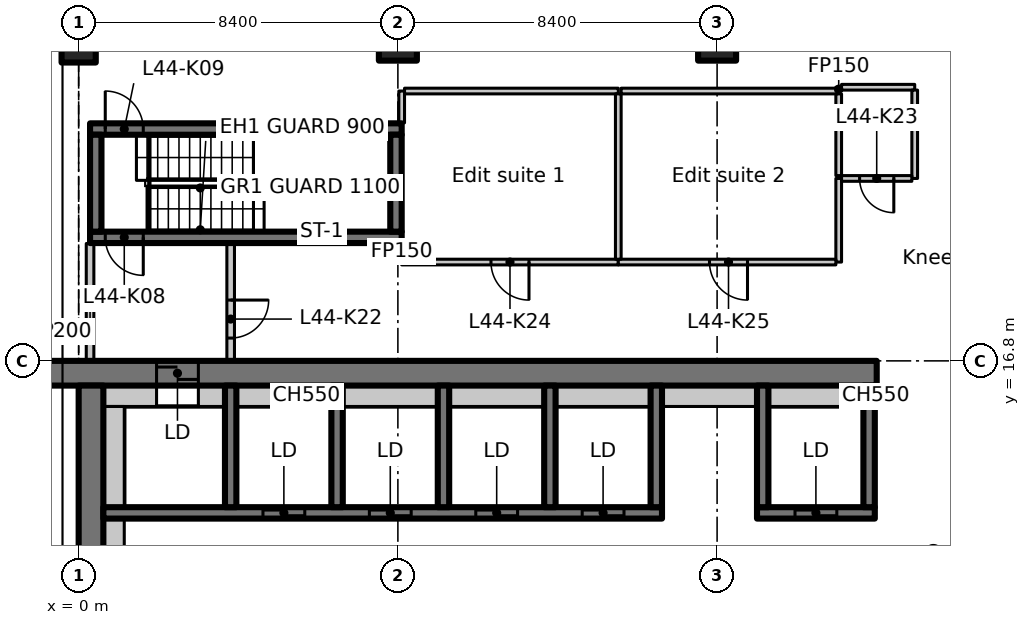
"""IFC4 building model, lengths in metres.
Left out: names, types, materials, properties, quantities, classifications, styles, units other than length and angle.
Written with IfcOpenShell. Run it as: python <this file> out.ifc"""

import sys

from ifc_helpers import new_model, si_unit, direction, frame, frame_2d, origin, origin_2d, place, context, subcontext, project, spatial, rectangle, extrude, element, fill, save


model = new_model("IFC4")
c1 = context("Model", 3, precision=1e-05, world=origin(), true_north=direction((0.0, 1.0)))
c2 = subcontext(c1, "Body", "Model", "MODEL_VIEW")
j1 = project(units=[si_unit("LENGTHUNIT", "METRE"), si_unit("PLANEANGLEUNIT", "RADIAN")], contexts=[c1])
p1 = place(None, origin())
s1 = spatial("IfcSite", under=j1, at=p1, CompositionType="ELEMENT")
p2 = place(p1, origin())
s2 = spatial("IfcBuilding", under=s1, at=p2, CompositionType="ELEMENT")
p3 = place(p2, frame((0.0, 0.0, 177.6)))
s3 = spatial("IfcBuildingStorey", under=s2, at=p3, CompositionType="ELEMENT", Elevation=177.6)
p4 = place(p3, frame((0.0, 25.2, 0.0), z_axis=(0.0, 0.0, 1.0), x_axis=(1.0, 0.0, 0.0)))
e1 = element("IfcColumn", 1, at=p4, inside=s3, PredefinedType="COLUMN", context=c2, shape_type="SweptSolid", body=[
    extrude(rectangle(XDim=0.9, YDim=1.1, at=origin_2d()), origin(), (0.0, 0.0, 1.0), 3.35),
])
for number, where, z_axis, x_axis in (
    (2, (8.4, 25.2, 0.0), (0.0, 0.0, 1.0), (1.0, 0.0, 0.0)),
    (3, (16.8, 25.2, 0.0), (0.0, 0.0, 1.0), (1.0, 0.0, 0.0)),
):
    element("IfcColumn", number, at=place(p3, frame(where, z_axis=z_axis, x_axis=x_axis)), inside=s3, PredefinedType="COLUMN", context=c2, shape_type="SweptSolid", body=[
        extrude(rectangle(XDim=1.0, YDim=1.0, at=origin_2d()), origin(), (0.0, 0.0, 1.0), 3.35),
    ])
p5 = place(p3, frame((-1.1, 16.475, 0.0), z_axis=(0.0, 0.0, 1.0), x_axis=(1.0, 0.0, 0.0)))
e4 = element("IfcWall", 4, at=p5, inside=s3, PredefinedType="SHEAR", context=c2, shape_type="SweptSolid", body=[
    extrude(rectangle(XDim=22.1, YDim=0.65, at=frame_2d((11.05, 0.0))), origin(), (0.0, 0.0, 1.0), 3.35),
])
p6 = place(p5, frame((3.15, 0.0, 0.0)))
e5 = element("IfcOpeningElement", 5, at=p6, cuts=e4, PredefinedType="OPENING", context=c2, shape_type="SweptSolid", body=[
    extrude(rectangle(XDim=1.1, YDim=2.3, at=frame_2d((0.55, 1.15))), frame((0.0, 0.335, 0.0), z_axis=(0.0, -1.0, 0.0), x_axis=(1.0, 0.0, 0.0)), (0.0, 0.0, 1.0), 0.67),
])
p7 = place(p3, frame((0.325, 7.286, 0.0), z_axis=(0.0, 0.0, 1.0), x_axis=(0.0, 1.0, 0.0)))
e6 = element("IfcWall", 6, at=p7, inside=s3, PredefinedType="SHEAR", context=c2, shape_type="SweptSolid", body=[
    extrude(rectangle(XDim=8.864, YDim=0.65, at=frame_2d((4.432, 0.0))), origin(), (0.0, 0.0, 1.0), 3.35),
])
p8 = place(p3, frame((0.65, 15.875, 0.0), z_axis=(0.0, 0.0, 1.0), x_axis=(1.0, 0.0, 0.0)))
e7 = element("IfcWall", 7, at=p8, inside=s3, PredefinedType="PARTITIONING", context=c2, shape_type="SweptSolid", body=[
    extrude(rectangle(XDim=1.4, YDim=0.55, at=frame_2d((0.7, 0.0))), origin(), (0.0, 0.0, 1.0), 3.35),
])
p9 = place(p3, frame((0.65, 12.8, 0.0), z_axis=(0.0, 0.0, 1.0), x_axis=(1.0, 0.0, 0.0)))
e8 = element("IfcWall", 8, at=p9, inside=s3, PredefinedType="SHEAR", context=c2, shape_type="SweptSolid", body=[
    extrude(rectangle(XDim=14.7, YDim=0.3, at=frame_2d((7.35, 0.0))), origin(), (0.0, 0.0, 1.0), 3.35),
])
p10 = place(p9, frame((4.2, 0.0, 0.0)))
e9 = element("IfcOpeningElement", 9, at=p10, cuts=e8, PredefinedType="OPENING", context=c2, shape_type="SweptSolid", body=[
    extrude(rectangle(XDim=1.1, YDim=2.3, at=frame_2d((0.55, 1.15))), frame((0.0, 0.16, 0.0), z_axis=(0.0, -1.0, 0.0), x_axis=(1.0, 0.0, 0.0)), (0.0, 0.0, 1.0), 0.32),
])
p11 = place(p9, frame((7.0, 0.0, 0.0)))
e10 = element("IfcOpeningElement", 10, at=p11, cuts=e8, PredefinedType="OPENING", context=c2, shape_type="SweptSolid", body=[
    extrude(rectangle(XDim=1.1, YDim=2.3, at=frame_2d((0.55, 1.15))), frame((0.0, 0.16, 0.0), z_axis=(0.0, -1.0, 0.0), x_axis=(1.0, 0.0, 0.0)), (0.0, 0.0, 1.0), 0.32),
])
p12 = place(p9, frame((9.8, 0.0, 0.0)))
e11 = element("IfcOpeningElement", 11, at=p12, cuts=e8, PredefinedType="OPENING", context=c2, shape_type="SweptSolid", body=[
    extrude(rectangle(XDim=1.1, YDim=2.3, at=frame_2d((0.55, 1.15))), frame((0.0, 0.16, 0.0), z_axis=(0.0, -1.0, 0.0), x_axis=(1.0, 0.0, 0.0)), (0.0, 0.0, 1.0), 0.32),
])
p13 = place(p9, frame((12.6, 0.0, 0.0)))
e12 = element("IfcOpeningElement", 12, at=p13, cuts=e8, PredefinedType="OPENING", context=c2, shape_type="SweptSolid", body=[
    extrude(rectangle(XDim=1.1, YDim=2.3, at=frame_2d((0.55, 1.15))), frame((0.0, 0.16, 0.0), z_axis=(0.0, -1.0, 0.0), x_axis=(1.0, 0.0, 0.0)), (0.0, 0.0, 1.0), 0.32),
])
for number, where, z_axis, x_axis in (
    (13, (4.0, 12.95, 0.0), (0.0, 0.0, 1.0), (0.0, 1.0, 0.0)),
    (14, (6.8, 12.95, 0.0), (0.0, 0.0, 1.0), (0.0, 1.0, 0.0)),
    (15, (9.6, 12.95, 0.0), (0.0, 0.0, 1.0), (0.0, 1.0, 0.0)),
    (16, (12.4, 12.95, 0.0), (0.0, 0.0, 1.0), (0.0, 1.0, 0.0)),
    (17, (15.2, 12.95, 0.0), (0.0, 0.0, 1.0), (0.0, 1.0, 0.0)),
):
    element("IfcWall", number, at=place(p3, frame(where, z_axis=z_axis, x_axis=x_axis)), inside=s3, PredefinedType="SHEAR", context=c2, shape_type="SweptSolid", body=[
        extrude(rectangle(XDim=3.2, YDim=0.3, at=frame_2d((1.6, 0.0))), origin(), (0.0, 0.0, 1.0), 3.35),
    ])
p14 = place(p3, frame((17.85, 12.8, 0.0), z_axis=(0.0, 0.0, 1.0), x_axis=(1.0, 0.0, 0.0)))
e18 = element("IfcWall", 18, at=p14, inside=s3, PredefinedType="SHEAR", context=c2, shape_type="SweptSolid", body=[
    extrude(rectangle(XDim=3.1, YDim=0.3, at=frame_2d((1.55, 0.0))), origin(), (0.0, 0.0, 1.0), 3.35),
])
p15 = place(p14, frame((1.0, 0.0, 0.0)))
e19 = element("IfcOpeningElement", 19, at=p15, cuts=e18, PredefinedType="OPENING", context=c2, shape_type="SweptSolid", body=[
    extrude(rectangle(XDim=1.1, YDim=2.3, at=frame_2d((0.55, 1.15))), frame((0.0, 0.16, 0.0), z_axis=(0.0, -1.0, 0.0), x_axis=(1.0, 0.0, 0.0)), (0.0, 0.0, 1.0), 0.32),
])
for number, where, z_axis, x_axis in (
    (20, (18.0, 12.95, 0.0), (0.0, 0.0, 1.0), (0.0, 1.0, 0.0)),
    (21, (20.8, 12.95, 0.0), (0.0, 0.0, 1.0), (0.0, 1.0, 0.0)),
):
    element("IfcWall", number, at=place(p3, frame(where, z_axis=z_axis, x_axis=x_axis)), inside=s3, PredefinedType="SHEAR", context=c2, shape_type="SweptSolid", body=[
        extrude(rectangle(XDim=3.2, YDim=0.3, at=frame_2d((1.6, 0.0))), origin(), (0.0, 0.0, 1.0), 3.35),
    ])
p16 = place(p3, frame((8.5, 20.05, 0.0), z_axis=(0.0, 0.0, 1.0), x_axis=(-1.0, 0.0, 0.0)))
e22 = element("IfcWall", 22, at=p16, inside=s3, PredefinedType="SHEAR", context=c2, shape_type="SweptSolid", body=[
    extrude(rectangle(XDim=8.2, YDim=0.3, at=frame_2d((4.1, 0.0))), origin(), (0.0, 0.0, 1.0), 3.35),
])
p17 = place(p16, frame((6.8, 0.0, 0.0)))
e23 = element("IfcOpeningElement", 23, at=p17, cuts=e22, PredefinedType="OPENING", context=c2, shape_type="SweptSolid", body=[
    extrude(rectangle(XDim=1.0, YDim=2.1, at=frame_2d((0.5, 1.05))), frame((0.0, 0.16, 0.0), z_axis=(0.0, -1.0, 0.0), x_axis=(1.0, 0.0, 0.0)), (0.0, 0.0, 1.0), 0.32),
])
p18 = place(p3, frame((0.3, 22.9, 0.0), z_axis=(0.0, 0.0, 1.0), x_axis=(1.0, 0.0, 0.0)))
e24 = element("IfcWall", 24, at=p18, inside=s3, PredefinedType="SHEAR", context=c2, shape_type="SweptSolid", body=[
    extrude(rectangle(XDim=8.2, YDim=0.3, at=frame_2d((4.1, 0.0))), origin(), (0.0, 0.0, 1.0), 3.35),
])
p19 = place(p18, frame((0.4, 0.0, 0.0)))
e25 = element("IfcOpeningElement", 25, at=p19, cuts=e24, PredefinedType="OPENING", context=c2, shape_type="SweptSolid", body=[
    extrude(rectangle(XDim=1.0, YDim=2.1, at=frame_2d((0.5, 1.05))), frame((0.0, 0.16, 0.0), z_axis=(0.0, -1.0, 0.0), x_axis=(1.0, 0.0, 0.0)), (0.0, 0.0, 1.0), 0.32),
])
for number, where, z_axis, x_axis in (
    (26, (0.45, 20.2, 0.0), (0.0, 0.0, 1.0), (0.0, 1.0, 0.0)),
    (27, (8.35, 20.2, 0.0), (0.0, 0.0, 1.0), (0.0, 1.0, 0.0)),
):
    element("IfcWall", number, at=place(p3, frame(where, z_axis=z_axis, x_axis=x_axis)), inside=s3, PredefinedType="SHEAR", context=c2, shape_type="SweptSolid", body=[
        extrude(rectangle(XDim=2.55, YDim=0.3, at=frame_2d((1.275, 0.0))), origin(), (0.0, 0.0, 1.0), 3.35),
    ])
p20 = place(p3, frame((0.3, 16.812, 0.0), z_axis=(0.0, 0.0, 1.0), x_axis=(0.0, 1.0, 0.0)))
e28 = element("IfcWall", 28, at=p20, inside=s3, PredefinedType="PARTITIONING", context=c2, shape_type="SweptSolid", body=[
    extrude(rectangle(XDim=3.076, YDim=0.2, at=frame_2d((1.538, 0.0))), origin(), (0.0, 0.0, 1.0), 2.98),
])
p21 = place(p3, frame((4.0, 19.888, 0.0), z_axis=(0.0, 0.0, 1.0), x_axis=(0.0, -1.0, 0.0)))
e29 = element("IfcWall", 29, at=p21, inside=s3, PredefinedType="PARTITIONING", context=c2, shape_type="SweptSolid", body=[
    extrude(rectangle(XDim=3.076, YDim=0.2, at=frame_2d((1.538, 0.0))), origin(), (0.0, 0.0, 1.0), 3.35),
])
p22 = place(p21, frame((1.488, 0.0, 0.0)))
e30 = element("IfcOpeningElement", 30, at=p22, cuts=e29, PredefinedType="OPENING", context=c2, shape_type="SweptSolid", body=[
    extrude(rectangle(XDim=1.0, YDim=2.1, at=frame_2d((0.5, 1.05))), frame((0.0, 0.11, 0.0), z_axis=(0.0, -1.0, 0.0), x_axis=(1.0, 0.0, 0.0)), (0.0, 0.0, 1.0), 0.22),
])
p23 = place(p3, frame((14.2, 19.4, 0.0), z_axis=(0.0, 0.0, 1.0), x_axis=(-1.0, 0.0, 0.0)))
e31 = element("IfcWall", 31, at=p23, inside=s3, PredefinedType="PARTITIONING", context=c2, shape_type="SweptSolid", body=[
    extrude(rectangle(XDim=5.7, YDim=0.15, at=frame_2d((2.85, 0.0))), origin(), (0.0, 0.0, 1.0), 3.35),
])
p24 = place(p23, frame((2.35, 0.0, 0.0)))
e32 = element("IfcOpeningElement", 32, at=p24, cuts=e31, PredefinedType="OPENING", context=c2, shape_type="SweptSolid", body=[
    extrude(rectangle(XDim=1.0, YDim=2.1, at=frame_2d((0.5, 1.05))), frame((0.0, 0.085, 0.0), z_axis=(0.0, -1.0, 0.0), x_axis=(1.0, 0.0, 0.0)), (0.0, 0.0, 1.0), 0.17),
])
p25 = place(p3, frame((8.5, 19.475, 0.0), z_axis=(0.0, 0.0, 1.0), x_axis=(0.0, 1.0, 0.0)))
e33 = element("IfcWall", 33, at=p25, inside=s3, PredefinedType="PARTITIONING", context=c2, shape_type="SweptSolid", body=[
    extrude(rectangle(XDim=0.413, YDim=0.15, at=frame_2d((0.207, 0.0))), origin(), (0.0, 0.0, 1.0), 3.35),
])
p26 = place(p3, frame((8.5, 23.062, 0.0), z_axis=(0.0, 0.0, 1.0), x_axis=(0.0, 1.0, 0.0)))
e34 = element("IfcWall", 34, at=p26, inside=s3, PredefinedType="PARTITIONING", context=c2, shape_type="SweptSolid", body=[
    extrude(rectangle(XDim=0.838, YDim=0.15, at=frame_2d((0.419, 0.0))), origin(), (0.0, 0.0, 1.0), 3.35),
])
p27 = place(p3, frame((8.575, 23.9, 0.0), z_axis=(0.0, 0.0, 1.0), x_axis=(1.0, 0.0, 0.0)))
e35 = element("IfcWall", 35, at=p27, inside=s3, PredefinedType="PARTITIONING", context=c2, shape_type="SweptSolid", body=[
    extrude(rectangle(XDim=5.625, YDim=0.15, at=frame_2d((2.812, 0.0))), origin(), (0.0, 0.0, 1.0), 3.35),
])
p28 = place(p3, frame((20.0, 21.6, 0.0), z_axis=(0.0, 0.0, 1.0), x_axis=(0.0, -1.0, 0.0)))
e36 = element("IfcWall", 36, at=p28, inside=s3, PredefinedType="PARTITIONING", context=c2, shape_type="SweptSolid", body=[
    extrude(rectangle(XDim=2.2, YDim=0.15, at=frame_2d((1.1, 0.0))), origin(), (0.0, 0.0, 1.0), 3.35),
])
p29 = place(p3, frame((19.925, 19.4, 0.0), z_axis=(0.0, 0.0, 1.0), x_axis=(-1.0, 0.0, 0.0)))
e37 = element("IfcWall", 37, at=p29, inside=s3, PredefinedType="PARTITIONING", context=c2, shape_type="SweptSolid", body=[
    extrude(rectangle(XDim=5.725, YDim=0.15, at=frame_2d((2.863, 0.0))), origin(), (0.0, 0.0, 1.0), 3.35),
])
p30 = place(p29, frame((2.325, 0.0, 0.0)))
e38 = element("IfcOpeningElement", 38, at=p30, cuts=e37, PredefinedType="OPENING", context=c2, shape_type="SweptSolid", body=[
    extrude(rectangle(XDim=1.0, YDim=2.1, at=frame_2d((0.5, 1.05))), frame((0.0, 0.085, 0.0), z_axis=(0.0, -1.0, 0.0), x_axis=(1.0, 0.0, 0.0)), (0.0, 0.0, 1.0), 0.17),
])
p31 = place(p3, frame((14.2, 23.825, 0.0), z_axis=(0.0, 0.0, 1.0), x_axis=(0.0, -1.0, 0.0)))
e39 = element("IfcWall", 39, at=p31, inside=s3, PredefinedType="PARTITIONING", context=c2, shape_type="SweptSolid", body=[
    extrude(rectangle(XDim=4.35, YDim=0.15, at=frame_2d((2.175, 0.0))), origin(), (0.0, 0.0, 1.0), 3.35),
])
p32 = place(p3, frame((14.275, 23.9, 0.0), z_axis=(0.0, 0.0, 1.0), x_axis=(1.0, 0.0, 0.0)))
e40 = element("IfcWall", 40, at=p32, inside=s3, PredefinedType="PARTITIONING", context=c2, shape_type="SweptSolid", body=[
    extrude(rectangle(XDim=5.725, YDim=0.15, at=frame_2d((2.863, 0.0))), origin(), (0.0, 0.0, 1.0), 3.35),
])
p33 = place(p3, frame((20.0, 23.9, 0.0), z_axis=(0.0, 0.0, 1.0), x_axis=(0.0, 1.0, 0.0)))
e41 = element("IfcWall", 41, at=p33, inside=s3, PredefinedType="PARTITIONING", context=c2, shape_type="SweptSolid", body=[
    extrude(rectangle(XDim=0.1, YDim=0.15, at=frame_2d((0.05, 0.0))), origin(), (0.0, 0.0, 1.0), 3.35),
])
p34 = place(p3, frame((20.075, 24.0, 0.0), z_axis=(0.0, 0.0, 1.0), x_axis=(1.0, 0.0, 0.0)))
e42 = element("IfcWall", 42, at=p34, inside=s3, PredefinedType="PARTITIONING", context=c2, shape_type="SweptSolid", body=[
    extrude(rectangle(XDim=1.925, YDim=0.15, at=frame_2d((0.962, 0.0))), origin(), (0.0, 0.0, 1.0), 3.35),
])
p35 = place(p3, frame((22.0, 23.925, 0.0), z_axis=(0.0, 0.0, 1.0), x_axis=(0.0, -1.0, 0.0)))
e43 = element("IfcWall", 43, at=p35, inside=s3, PredefinedType="PARTITIONING", context=c2, shape_type="SweptSolid", body=[
    extrude(rectangle(XDim=2.325, YDim=0.15, at=frame_2d((1.163, 0.0))), origin(), (0.0, 0.0, 1.0), 3.35),
])
p36 = place(p3, frame((21.925, 21.6, 0.0), z_axis=(0.0, 0.0, 1.0), x_axis=(-1.0, 0.0, 0.0)))
e44 = element("IfcWall", 44, at=p36, inside=s3, PredefinedType="PARTITIONING", context=c2, shape_type="SweptSolid", body=[
    extrude(rectangle(XDim=1.85, YDim=0.15, at=frame_2d((0.925, 0.0))), origin(), (0.0, 0.0, 1.0), 3.35),
])
p37 = place(p36, frame((0.475, 0.0, 0.0)))
e45 = element("IfcOpeningElement", 45, at=p37, cuts=e44, PredefinedType="OPENING", context=c2, shape_type="SweptSolid", body=[
    extrude(rectangle(XDim=0.9, YDim=2.1, at=frame_2d((0.45, 1.05))), frame((0.0, 0.085, 0.0), z_axis=(0.0, -1.0, 0.0), x_axis=(1.0, 0.0, 0.0)), (0.0, 0.0, 1.0), 0.17),
])
p38 = place(p3, frame((20.0, 21.675, 0.0), z_axis=(0.0, 0.0, 1.0), x_axis=(0.0, 1.0, 0.0)))
e46 = element("IfcWall", 46, at=p38, inside=s3, PredefinedType="PARTITIONING", context=c2, shape_type="SweptSolid", body=[
    extrude(rectangle(XDim=2.15, YDim=0.15, at=frame_2d((1.075, 0.0))), origin(), (0.0, 0.0, 1.0), 3.35),
])
p39 = place(p3, frame((0.925, 7.286, 0.0), z_axis=(0.0, 0.0, 1.0), x_axis=(0.0, 1.0, 0.0)))
e47 = element("IfcWall", 47, at=p39, inside=s3, PredefinedType="PARTITIONING", context=c2, shape_type="SweptSolid", body=[
    extrude(rectangle(XDim=5.364, YDim=0.55, at=frame_2d((2.682, 0.0))), origin(), (0.0, 0.0, 1.0), 3.35),
])
p40 = place(p3, frame((0.925, 12.95, 0.0), z_axis=(0.0, 0.0, 1.0), x_axis=(0.0, 1.0, 0.0)))
e48 = element("IfcWall", 48, at=p40, inside=s3, PredefinedType="PARTITIONING", context=c2, shape_type="SweptSolid", body=[
    extrude(rectangle(XDim=2.65, YDim=0.55, at=frame_2d((1.325, 0.0))), origin(), (0.0, 0.0, 1.0), 3.35),
])
p41 = place(p3, frame((3.15, 15.875, 0.0), z_axis=(0.0, 0.0, 1.0), x_axis=(1.0, 0.0, 0.0)))
e49 = element("IfcWall", 49, at=p41, inside=s3, PredefinedType="PARTITIONING", context=c2, shape_type="SweptSolid", body=[
    extrude(rectangle(XDim=0.7, YDim=0.55, at=frame_2d((0.35, 0.0))), origin(), (0.0, 0.0, 1.0), 3.35),
])
for number, where, z_axis, x_axis in (
    (50, (4.15, 15.875, 0.0), (0.0, 0.0, 1.0), (1.0, 0.0, 0.0)),
    (51, (6.95, 15.875, 0.0), (0.0, 0.0, 1.0), (1.0, 0.0, 0.0)),
    (52, (9.75, 15.875, 0.0), (0.0, 0.0, 1.0), (1.0, 0.0, 0.0)),
    (53, (12.55, 15.875, 0.0), (0.0, 0.0, 1.0), (1.0, 0.0, 0.0)),
    (54, (15.35, 15.875, 0.0), (0.0, 0.0, 1.0), (1.0, 0.0, 0.0)),
    (55, (18.15, 15.875, 0.0), (0.0, 0.0, 1.0), (1.0, 0.0, 0.0)),
):
    element("IfcWall", number, at=place(p3, frame(where, z_axis=z_axis, x_axis=x_axis)), inside=s3, PredefinedType="PARTITIONING", context=c2, shape_type="SweptSolid", body=[
        extrude(rectangle(XDim=2.5, YDim=0.55, at=frame_2d((1.25, 0.0))), origin(), (0.0, 0.0, 1.0), 3.35),
    ])
p42 = place(p3, frame((20.95, 15.875, 0.0), z_axis=(0.0, 0.0, 1.0), x_axis=(1.0, 0.0, 0.0)))
e56 = element("IfcWall", 56, at=p42, inside=s3, PredefinedType="PARTITIONING", context=c2, shape_type="SweptSolid", body=[
    extrude(rectangle(XDim=0.05, YDim=0.55, at=frame_2d((0.025, 0.0))), origin(), (0.0, 0.0, 1.0), 3.35),
])
p43 = place(p6, origin())
e57 = element("IfcDoor", 57, at=p43, inside=s3, OperationType="SLIDING_TO_LEFT", PredefinedType="DOOR", context=c2, shape_type="SweptSolid", body=[
    extrude(rectangle(XDim=1.1, YDim=2.3, at=frame_2d((0.55, 1.15))), frame((0.0, 0.025, 0.0), z_axis=(0.0, -1.0, 0.0), x_axis=(1.0, 0.0, 0.0)), (0.0, 0.0, 1.0), 0.05),
])
fill(e5, e57)
p44 = place(p10, origin())
e58 = element("IfcDoor", 58, at=p44, inside=s3, OperationType="SLIDING_TO_LEFT", PredefinedType="DOOR", context=c2, shape_type="SweptSolid", body=[
    extrude(rectangle(XDim=1.1, YDim=2.3, at=frame_2d((0.55, 1.15))), frame((0.0, 0.025, 0.0), z_axis=(0.0, -1.0, 0.0), x_axis=(1.0, 0.0, 0.0)), (0.0, 0.0, 1.0), 0.05),
])
fill(e9, e58)
p45 = place(p11, origin())
e59 = element("IfcDoor", 59, at=p45, inside=s3, OperationType="SLIDING_TO_LEFT", PredefinedType="DOOR", context=c2, shape_type="SweptSolid", body=[
    extrude(rectangle(XDim=1.1, YDim=2.3, at=frame_2d((0.55, 1.15))), frame((0.0, 0.025, 0.0), z_axis=(0.0, -1.0, 0.0), x_axis=(1.0, 0.0, 0.0)), (0.0, 0.0, 1.0), 0.05),
])
fill(e10, e59)
p46 = place(p12, origin())
e60 = element("IfcDoor", 60, at=p46, inside=s3, OperationType="SLIDING_TO_LEFT", PredefinedType="DOOR", context=c2, shape_type="SweptSolid", body=[
    extrude(rectangle(XDim=1.1, YDim=2.3, at=frame_2d((0.55, 1.15))), frame((0.0, 0.025, 0.0), z_axis=(0.0, -1.0, 0.0), x_axis=(1.0, 0.0, 0.0)), (0.0, 0.0, 1.0), 0.05),
])
fill(e11, e60)
p47 = place(p13, origin())
e61 = element("IfcDoor", 61, at=p47, inside=s3, OperationType="SLIDING_TO_LEFT", PredefinedType="DOOR", context=c2, shape_type="SweptSolid", body=[
    extrude(rectangle(XDim=1.1, YDim=2.3, at=frame_2d((0.55, 1.15))), frame((0.0, 0.025, 0.0), z_axis=(0.0, -1.0, 0.0), x_axis=(1.0, 0.0, 0.0)), (0.0, 0.0, 1.0), 0.05),
])
fill(e12, e61)
p48 = place(p15, origin())
e62 = element("IfcDoor", 62, at=p48, inside=s3, OperationType="SLIDING_TO_LEFT", PredefinedType="DOOR", context=c2, shape_type="SweptSolid", body=[
    extrude(rectangle(XDim=1.1, YDim=2.3, at=frame_2d((0.55, 1.15))), frame((0.0, 0.025, 0.0), z_axis=(0.0, -1.0, 0.0), x_axis=(1.0, 0.0, 0.0)), (0.0, 0.0, 1.0), 0.05),
])
fill(e19, e62)
p49 = place(p17, origin())
e63 = element("IfcDoor", 63, at=p49, inside=s3, OperationType="SINGLE_SWING_LEFT", PredefinedType="DOOR", context=c2, shape_type="SweptSolid", body=[
    extrude(rectangle(XDim=1.0, YDim=2.1, at=frame_2d((0.5, 1.05))), frame((0.0, 0.025, 0.0), z_axis=(0.0, -1.0, 0.0), x_axis=(1.0, 0.0, 0.0)), (0.0, 0.0, 1.0), 0.05),
])
fill(e23, e63)
p50 = place(p19, origin())
e64 = element("IfcDoor", 64, at=p50, inside=s3, OperationType="SINGLE_SWING_RIGHT", PredefinedType="DOOR", context=c2, shape_type="SweptSolid", body=[
    extrude(rectangle(XDim=1.0, YDim=2.1, at=frame_2d((0.5, 1.05))), frame((0.0, 0.025, 0.0), z_axis=(0.0, -1.0, 0.0), x_axis=(1.0, 0.0, 0.0)), (0.0, 0.0, 1.0), 0.05),
])
fill(e25, e64)
p51 = place(p22, origin())
e65 = element("IfcDoor", 65, at=p51, inside=s3, OperationType="SINGLE_SWING_LEFT", PredefinedType="DOOR", context=c2, shape_type="SweptSolid", body=[
    extrude(rectangle(XDim=1.0, YDim=2.1, at=frame_2d((0.5, 1.05))), frame((0.0, 0.025, 0.0), z_axis=(0.0, -1.0, 0.0), x_axis=(1.0, 0.0, 0.0)), (0.0, 0.0, 1.0), 0.05),
])
fill(e30, e65)
p52 = place(p37, origin())
e66 = element("IfcDoor", 66, at=p52, inside=s3, OperationType="SINGLE_SWING_RIGHT", PredefinedType="DOOR", context=c2, shape_type="SweptSolid", body=[
    extrude(rectangle(XDim=0.9, YDim=2.1, at=frame_2d((0.45, 1.05))), frame((0.0, 0.025, 0.0), z_axis=(0.0, -1.0, 0.0), x_axis=(1.0, 0.0, 0.0)), (0.0, 0.0, 1.0), 0.05),
])
fill(e45, e66)
p53 = place(p24, origin())
e67 = element("IfcDoor", 67, at=p53, inside=s3, OperationType="SINGLE_SWING_LEFT", PredefinedType="DOOR", context=c2, shape_type="SweptSolid", body=[
    extrude(rectangle(XDim=1.0, YDim=2.1, at=frame_2d((0.5, 1.05))), frame((0.0, 0.025, 0.0), z_axis=(0.0, -1.0, 0.0), x_axis=(1.0, 0.0, 0.0)), (0.0, 0.0, 1.0), 0.05),
])
fill(e32, e67)
p54 = place(p30, origin())
e68 = element("IfcDoor", 68, at=p54, inside=s3, OperationType="SINGLE_SWING_RIGHT", PredefinedType="DOOR", context=c2, shape_type="SweptSolid", body=[
    extrude(rectangle(XDim=1.0, YDim=2.1, at=frame_2d((0.5, 1.05))), frame((0.0, 0.025, 0.0), z_axis=(0.0, -1.0, 0.0), x_axis=(1.0, 0.0, 0.0)), (0.0, 0.0, 1.0), 0.05),
])
fill(e38, e68)
save(model, sys.argv[1])
